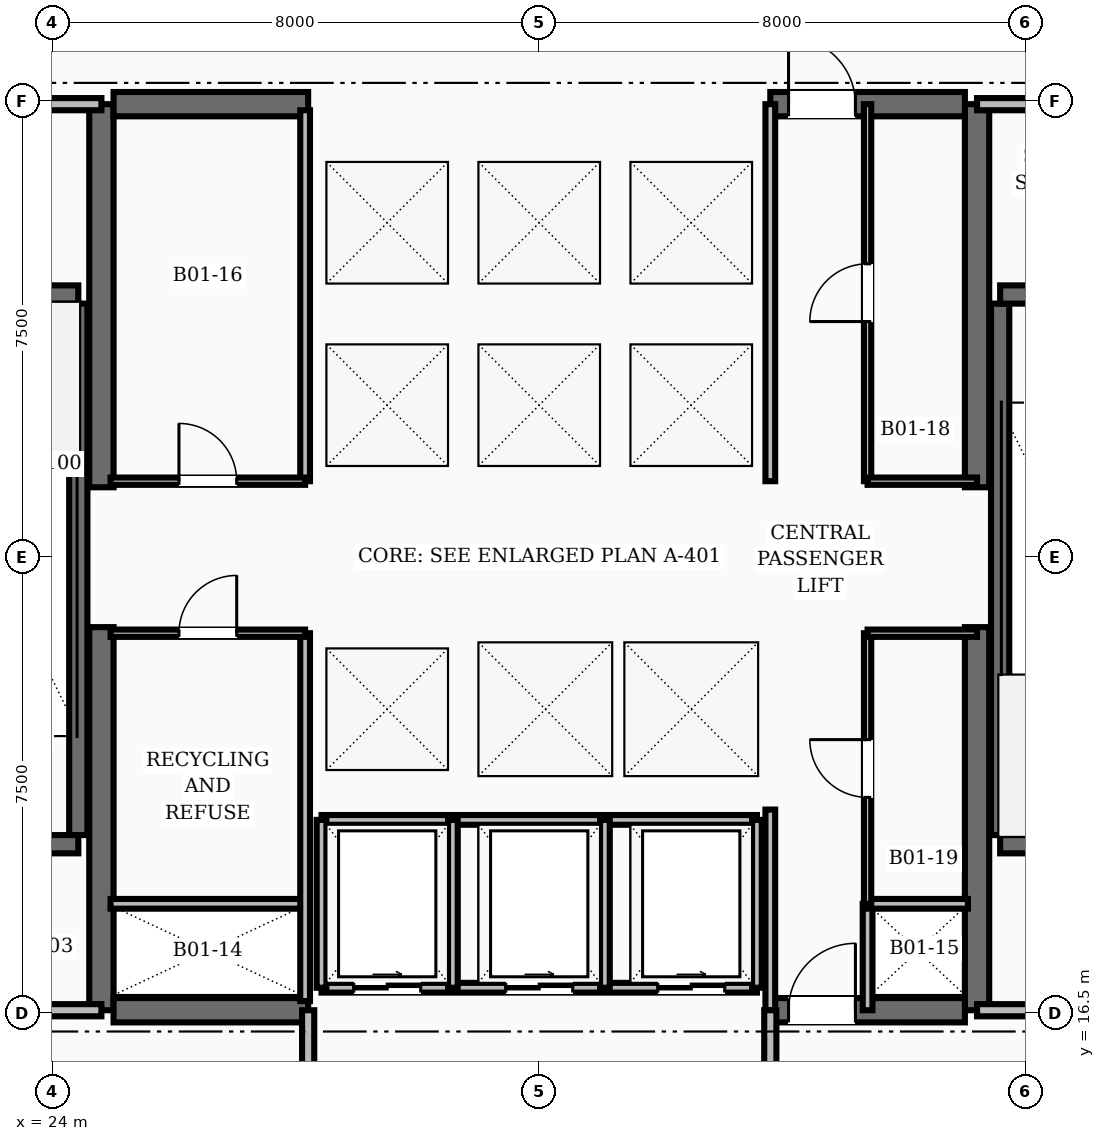
"""IFC4 building model, lengths in metres.
Left out: names, types, materials, properties, quantities, classifications, styles, units other than length and angle.
Written with IfcOpenShell. Run it as: python <this file> out.ifc"""

import sys

from ifc_helpers import new_model, si_unit, direction, frame, frame_2d, origin, place, context, subcontext, project, spatial, rectangle, extrude, element, fill, save


model = new_model("IFC4")
c1 = context("Model", 3, precision=1e-05, world=origin(), true_north=direction((0.0, 1.0)))
c2 = subcontext(c1, "Body", "Model", "MODEL_VIEW")
j1 = project(units=[si_unit("LENGTHUNIT", "METRE"), si_unit("PLANEANGLEUNIT", "RADIAN")], contexts=[c1])
p1 = place(None, origin())
s1 = spatial("IfcSite", under=j1, at=p1, CompositionType="ELEMENT")
p2 = place(p1, origin())
s2 = spatial("IfcBuilding", under=s1, at=p2, CompositionType="ELEMENT")
p3 = place(p2, frame((0.0, 0.0, -5.2)))
s3 = spatial("IfcBuildingStorey", under=s2, at=p3, CompositionType="ELEMENT", Elevation=-5.2)
for number, where, z_axis, x_axis in (
    (1, (24.8, 16.55, 0.0), (0.0, 0.0, 1.0), (0.0, 1.0, 0.0)),
    (2, (24.8, 25.15, 0.0), (0.0, 0.0, 1.0), (0.0, 1.0, 0.0)),
    (3, (39.2, 16.55, 0.0), (0.0, 0.0, 1.0), (0.0, 1.0, 0.0)),
    (4, (39.2, 25.15, 0.0), (0.0, 0.0, 1.0), (0.0, 1.0, 0.0)),
):
    element("IfcWall", number, at=place(p3, frame(where, z_axis=z_axis, x_axis=x_axis)), inside=s3, PredefinedType="SHEAR", context=c2, shape_type="SweptSolid", body=[
        extrude(rectangle(XDim=6.3, YDim=0.4, at=frame_2d((3.15, 0.0))), origin(), (0.0, 0.0, 1.0), 5.2),
    ])
p4 = place(p3, frame((25.0, 16.55, 0.0), z_axis=(0.0, 0.0, 1.0), x_axis=(1.0, 0.0, 0.0)))
e5 = element("IfcWall", 5, at=p4, inside=s3, PredefinedType="SHEAR", context=c2, shape_type="SweptSolid", body=[
    extrude(rectangle(XDim=3.2, YDim=0.4, at=frame_2d((1.6, 0.0))), origin(), (0.0, 0.0, 1.0), 5.2),
])
p5 = place(p3, frame((35.8, 16.55, 0.0), z_axis=(0.0, 0.0, 1.0), x_axis=(1.0, 0.0, 0.0)))
e6 = element("IfcWall", 6, at=p5, inside=s3, PredefinedType="SHEAR", context=c2, shape_type="SweptSolid", body=[
    extrude(rectangle(XDim=3.2, YDim=0.4, at=frame_2d((1.6, 0.0))), origin(), (0.0, 0.0, 1.0), 5.2),
])
p6 = place(p5, frame((0.3, 0.0, 0.0)))
e7 = element("IfcOpeningElement", 7, at=p6, cuts=e6, PredefinedType="OPENING", context=c2, shape_type="SweptSolid", body=[
    extrude(rectangle(XDim=1.1, YDim=2.1, at=frame_2d((0.55, 1.05))), frame((0.0, 0.21, 0.0), z_axis=(0.0, -1.0, 0.0), x_axis=(1.0, 0.0, 0.0)), (0.0, 0.0, 1.0), 0.42),
])
p7 = place(p3, frame((25.0, 31.45, 0.0), z_axis=(0.0, 0.0, 1.0), x_axis=(1.0, 0.0, 0.0)))
e8 = element("IfcWall", 8, at=p7, inside=s3, PredefinedType="SHEAR", context=c2, shape_type="SweptSolid", body=[
    extrude(rectangle(XDim=3.2, YDim=0.4, at=frame_2d((1.6, 0.0))), origin(), (0.0, 0.0, 1.0), 5.2),
])
p8 = place(p3, frame((35.8, 31.45, 0.0), z_axis=(0.0, 0.0, 1.0), x_axis=(1.0, 0.0, 0.0)))
e9 = element("IfcWall", 9, at=p8, inside=s3, PredefinedType="SHEAR", context=c2, shape_type="SweptSolid", body=[
    extrude(rectangle(XDim=3.2, YDim=0.4, at=frame_2d((1.6, 0.0))), origin(), (0.0, 0.0, 1.0), 5.2),
])
p9 = place(p8, frame((0.3, 0.0, 0.0)))
e10 = element("IfcOpeningElement", 10, at=p9, cuts=e9, PredefinedType="OPENING", context=c2, shape_type="SweptSolid", body=[
    extrude(rectangle(XDim=1.1, YDim=2.1, at=frame_2d((0.55, 1.05))), frame((0.0, 0.21, 0.0), z_axis=(0.0, -1.0, 0.0), x_axis=(1.0, 0.0, 0.0)), (0.0, 0.0, 1.0), 0.42),
])
p10 = place(p3, frame((24.42, 19.43, 0.0), z_axis=(0.0, 0.0, 1.0), x_axis=(0.0, 1.0, 0.0)))
e11 = element("IfcWall", 11, at=p10, inside=s3, PredefinedType="SHEAR", context=c2, shape_type="SweptSolid", body=[
    extrude(rectangle(XDim=8.74, YDim=0.3, at=frame_2d((4.37, 0.0))), origin(), (0.0, 0.0, 1.0), 5.2),
])
p11 = place(p3, frame((20.82, 19.28, 0.0), z_axis=(0.0, 0.0, 1.0), x_axis=(1.0, 0.0, 0.0)))
e12 = element("IfcWall", 12, at=p11, inside=s3, PredefinedType="SHEAR", context=c2, shape_type="SweptSolid", body=[
    extrude(rectangle(XDim=3.6, YDim=0.3, at=frame_2d((1.8, 0.0))), origin(), (0.0, 0.0, 1.0), 5.2),
])
p12 = place(p11, frame((1.3, 0.0, 0.0)))
e13 = element("IfcOpeningElement", 13, at=p12, cuts=e12, PredefinedType="OPENING", context=c2, shape_type="SweptSolid", body=[
    extrude(rectangle(XDim=1.1, YDim=2.1, at=frame_2d((0.55, 1.05))), frame((0.0, 0.16, 0.0), z_axis=(0.0, -1.0, 0.0), x_axis=(1.0, 0.0, 0.0)), (0.0, 0.0, 1.0), 0.32),
])
p13 = place(p3, frame((20.82, 28.32, 0.0), z_axis=(0.0, 0.0, 1.0), x_axis=(1.0, 0.0, 0.0)))
e14 = element("IfcWall", 14, at=p13, inside=s3, PredefinedType="SHEAR", context=c2, shape_type="SweptSolid", body=[
    extrude(rectangle(XDim=3.6, YDim=0.3, at=frame_2d((1.8, 0.0))), origin(), (0.0, 0.0, 1.0), 5.2),
])
p14 = place(p3, frame((39.58, 19.43, 0.0), z_axis=(0.0, 0.0, 1.0), x_axis=(0.0, 1.0, 0.0)))
e15 = element("IfcWall", 15, at=p14, inside=s3, PredefinedType="SHEAR", context=c2, shape_type="SweptSolid", body=[
    extrude(rectangle(XDim=8.74, YDim=0.3, at=frame_2d((4.37, 0.0))), origin(), (0.0, 0.0, 1.0), 5.2),
])
p15 = place(p3, frame((39.58, 19.28, 0.0), z_axis=(0.0, 0.0, 1.0), x_axis=(1.0, 0.0, 0.0)))
e16 = element("IfcWall", 16, at=p15, inside=s3, PredefinedType="SHEAR", context=c2, shape_type="SweptSolid", body=[
    extrude(rectangle(XDim=3.6, YDim=0.3, at=frame_2d((1.8, 0.0))), origin(), (0.0, 0.0, 1.0), 5.2),
])
p16 = place(p3, frame((39.58, 28.32, 0.0), z_axis=(0.0, 0.0, 1.0), x_axis=(1.0, 0.0, 0.0)))
e17 = element("IfcWall", 17, at=p16, inside=s3, PredefinedType="SHEAR", context=c2, shape_type="SweptSolid", body=[
    extrude(rectangle(XDim=3.6, YDim=0.3, at=frame_2d((1.8, 0.0))), origin(), (0.0, 0.0, 1.0), 5.2),
])
p17 = place(p16, frame((1.3, 0.0, 0.0)))
e18 = element("IfcOpeningElement", 18, at=p17, cuts=e17, PredefinedType="OPENING", context=c2, shape_type="SweptSolid", body=[
    extrude(rectangle(XDim=1.1, YDim=2.1, at=frame_2d((0.55, 1.05))), frame((0.0, 0.16, 0.0), z_axis=(0.0, -1.0, 0.0), x_axis=(1.0, 0.0, 0.0)), (0.0, 0.0, 1.0), 0.32),
])
for number, where, z_axis, x_axis in (
    (19, (20.82, 16.55, 0.0), (0.0, 0.0, 1.0), (1.0, 0.0, 0.0)),
    (20, (39.2, 31.45, 0.0), (0.0, 0.0, 1.0), (1.0, 0.0, 0.0)),
    (21, (20.82, 31.45, 0.0), (0.0, 0.0, 1.0), (1.0, 0.0, 0.0)),
    (22, (39.2, 16.55, 0.0), (0.0, 0.0, 1.0), (1.0, 0.0, 0.0)),
):
    element("IfcWall", number, at=place(p3, frame(where, z_axis=z_axis, x_axis=x_axis)), inside=s3, PredefinedType="SOLIDWALL", context=c2, shape_type="SweptSolid", body=[
        extrude(rectangle(XDim=3.98, YDim=0.2, at=frame_2d((1.99, 0.0))), origin(), (0.0, 0.0, 1.0), 3.92),
    ])
p18 = place(p3, frame((35.8, 16.55, 0.0), z_axis=(0.0, 0.0, 1.0), x_axis=(0.0, 1.0, 0.0)))
e23 = element("IfcWall", 23, at=p18, inside=s3, PredefinedType="SOLIDWALL", context=c2, shape_type="SweptSolid", body=[
    extrude(rectangle(XDim=3.3, YDim=0.16, at=frame_2d((1.65, 0.0))), origin(), (0.0, 0.0, 1.0), 3.92),
])
p19 = place(p3, frame((37.4, 16.55, 0.0), z_axis=(0.0, 0.0, 1.0), x_axis=(0.0, 1.0, 0.0)))
e24 = element("IfcWall", 24, at=p19, inside=s3, PredefinedType="SOLIDWALL", context=c2, shape_type="SweptSolid", body=[
    extrude(rectangle(XDim=1.75, YDim=0.16, at=frame_2d((0.875, 0.0))), origin(), (0.0, 0.0, 1.0), 3.92),
])
p20 = place(p3, frame((35.8, 25.25, 0.0), z_axis=(0.0, 0.0, 1.0), x_axis=(0.0, 1.0, 0.0)))
e25 = element("IfcWall", 25, at=p20, inside=s3, PredefinedType="SOLIDWALL", context=c2, shape_type="SweptSolid", body=[
    extrude(rectangle(XDim=6.2, YDim=0.16, at=frame_2d((3.1, 0.0))), origin(), (0.0, 0.0, 1.0), 3.92),
])
for number, where, z_axis, x_axis in (
    (26, (28.2, 14.35, 0.0), (0.0, 0.0, 1.0), (0.0, 1.0, 0.0)),
    (27, (35.8, 14.35, 0.0), (0.0, 0.0, 1.0), (0.0, 1.0, 0.0)),
):
    element("IfcWall", number, at=place(p3, frame(where, z_axis=z_axis, x_axis=x_axis)), inside=s3, PredefinedType="SOLIDWALL", context=c2, shape_type="SweptSolid", body=[
        extrude(rectangle(XDim=2.2, YDim=0.2, at=frame_2d((1.1, 0.0))), origin(), (0.0, 0.0, 1.0), 3.92),
    ])
p21 = place(p3, frame((28.42, 16.92, 0.0), z_axis=(0.0, 0.0, 1.0), x_axis=(1.0, 0.0, 0.0)))
e28 = element("IfcWall", 28, at=p21, inside=s3, PredefinedType="SOLIDWALL", context=c2, shape_type="SweptSolid", body=[
    extrude(rectangle(XDim=7.16, YDim=0.16, at=frame_2d((3.58, 0.0))), origin(), (0.0, 0.0, 1.0), 3.92),
])
p22 = place(p21, frame((0.53, 0.0, 0.0)))
e29 = element("IfcOpeningElement", 29, at=p22, cuts=e28, PredefinedType="OPENING", context=c2, shape_type="SweptSolid", body=[
    extrude(rectangle(XDim=1.1, YDim=2.15, at=frame_2d((0.55, 1.075))), frame((0.0, 0.09, 0.0), z_axis=(0.0, -1.0, 0.0), x_axis=(1.0, 0.0, 0.0)), (0.0, 0.0, 1.0), 0.18),
])
p23 = place(p21, frame((3.03, 0.0, 0.0)))
e30 = element("IfcOpeningElement", 30, at=p23, cuts=e28, PredefinedType="OPENING", context=c2, shape_type="SweptSolid", body=[
    extrude(rectangle(XDim=1.1, YDim=2.15, at=frame_2d((0.55, 1.075))), frame((0.0, 0.09, 0.0), z_axis=(0.0, -1.0, 0.0), x_axis=(1.0, 0.0, 0.0)), (0.0, 0.0, 1.0), 0.18),
])
p24 = place(p21, frame((5.53, 0.0, 0.0)))
e31 = element("IfcOpeningElement", 31, at=p24, cuts=e28, PredefinedType="OPENING", context=c2, shape_type="SweptSolid", body=[
    extrude(rectangle(XDim=1.1, YDim=2.15, at=frame_2d((0.55, 1.075))), frame((0.0, 0.09, 0.0), z_axis=(0.0, -1.0, 0.0), x_axis=(1.0, 0.0, 0.0)), (0.0, 0.0, 1.0), 0.18),
])
p25 = place(p3, frame((28.42, 19.68, 0.0), z_axis=(0.0, 0.0, 1.0), x_axis=(1.0, 0.0, 0.0)))
e32 = element("IfcWall", 32, at=p25, inside=s3, PredefinedType="SOLIDWALL", context=c2, shape_type="SweptSolid", body=[
    extrude(rectangle(XDim=7.16, YDim=0.16, at=frame_2d((3.58, 0.0))), origin(), (0.0, 0.0, 1.0), 3.92),
])
for number, where, z_axis, x_axis in (
    (33, (28.42, 16.92, 0.0), (0.0, 0.0, 1.0), (0.0, 1.0, 0.0)),
    (34, (30.58, 16.92, 0.0), (0.0, 0.0, 1.0), (0.0, 1.0, 0.0)),
    (35, (33.08, 16.92, 0.0), (0.0, 0.0, 1.0), (0.0, 1.0, 0.0)),
    (36, (35.58, 16.92, 0.0), (0.0, 0.0, 1.0), (0.0, 1.0, 0.0)),
):
    element("IfcWall", number, at=place(p3, frame(where, z_axis=z_axis, x_axis=x_axis)), inside=s3, PredefinedType="SOLIDWALL", context=c2, shape_type="SweptSolid", body=[
        extrude(rectangle(XDim=2.76, YDim=0.16, at=frame_2d((1.38, 0.0))), origin(), (0.0, 0.0, 1.0), 3.92),
    ])
p26 = place(p3, frame((24.95, 18.3, 0.0), z_axis=(0.0, 0.0, 1.0), x_axis=(1.0, 0.0, 0.0)))
e37 = element("IfcWall", 37, at=p26, inside=s3, PredefinedType="SOLIDWALL", context=c2, shape_type="SweptSolid", body=[
    extrude(rectangle(XDim=3.2, YDim=0.16, at=frame_2d((1.6, 0.0))), origin(), (0.0, 0.0, 1.0), 3.92),
])
p27 = place(p3, frame((28.15, 16.7, 0.0), z_axis=(0.0, 0.0, 1.0), x_axis=(0.0, 1.0, 0.0)))
e38 = element("IfcWall", 38, at=p27, inside=s3, PredefinedType="SOLIDWALL", context=c2, shape_type="SweptSolid", body=[
    extrude(rectangle(XDim=6.05, YDim=0.16, at=frame_2d((3.025, 0.0))), origin(), (0.0, 0.0, 1.0), 3.92),
])
p28 = place(p3, frame((37.4, 18.3, 0.0), z_axis=(0.0, 0.0, 1.0), x_axis=(1.0, 0.0, 0.0)))
e39 = element("IfcWall", 39, at=p28, inside=s3, PredefinedType="SOLIDWALL", context=c2, shape_type="SweptSolid", body=[
    extrude(rectangle(XDim=1.65, YDim=0.16, at=frame_2d((0.825, 0.0))), origin(), (0.0, 0.0, 1.0), 3.92),
])
p29 = place(p3, frame((28.15, 25.25, 0.0), z_axis=(0.0, 0.0, 1.0), x_axis=(0.0, 1.0, 0.0)))
e40 = element("IfcWall", 40, at=p29, inside=s3, PredefinedType="SOLIDWALL", context=c2, shape_type="SweptSolid", body=[
    extrude(rectangle(XDim=6.1, YDim=0.16, at=frame_2d((3.05, 0.0))), origin(), (0.0, 0.0, 1.0), 3.92),
])
p30 = place(p3, frame((24.95, 25.25, 0.0), z_axis=(0.0, 0.0, 1.0), x_axis=(1.0, 0.0, 0.0)))
e41 = element("IfcWall", 41, at=p30, inside=s3, PredefinedType="PARTITIONING", context=c2, shape_type="SweptSolid", body=[
    extrude(rectangle(XDim=3.2, YDim=0.12, at=frame_2d((1.6, 0.0))), origin(), (0.0, 0.0, 1.0), 3.92),
])
p31 = place(p30, frame((1.125, 0.0, 0.0)))
e42 = element("IfcOpeningElement", 42, at=p31, cuts=e41, PredefinedType="OPENING", context=c2, shape_type="SweptSolid", body=[
    extrude(rectangle(XDim=0.95, YDim=2.1, at=frame_2d((0.475, 1.05))), frame((0.0, 0.07, 0.0), z_axis=(0.0, -1.0, 0.0), x_axis=(1.0, 0.0, 0.0)), (0.0, 0.0, 1.0), 0.14),
])
p32 = place(p3, frame((24.95, 22.75, 0.0), z_axis=(0.0, 0.0, 1.0), x_axis=(1.0, 0.0, 0.0)))
e43 = element("IfcWall", 43, at=p32, inside=s3, PredefinedType="PARTITIONING", context=c2, shape_type="SweptSolid", body=[
    extrude(rectangle(XDim=3.2, YDim=0.12, at=frame_2d((1.6, 0.0))), origin(), (0.0, 0.0, 1.0), 3.92),
])
p33 = place(p32, frame((1.125, 0.0, 0.0)))
e44 = element("IfcOpeningElement", 44, at=p33, cuts=e43, PredefinedType="OPENING", context=c2, shape_type="SweptSolid", body=[
    extrude(rectangle(XDim=0.95, YDim=2.1, at=frame_2d((0.475, 1.05))), frame((0.0, 0.07, 0.0), z_axis=(0.0, -1.0, 0.0), x_axis=(1.0, 0.0, 0.0)), (0.0, 0.0, 1.0), 0.14),
])
p34 = place(p3, frame((37.4, 25.25, 0.0), z_axis=(0.0, 0.0, 1.0), x_axis=(0.0, 1.0, 0.0)))
e45 = element("IfcWall", 45, at=p34, inside=s3, PredefinedType="PARTITIONING", context=c2, shape_type="SweptSolid", body=[
    extrude(rectangle(XDim=6.2, YDim=0.12, at=frame_2d((3.1, 0.0))), origin(), (0.0, 0.0, 1.0), 3.92),
])
p35 = place(p34, frame((2.625, 0.0, 0.0)))
e46 = element("IfcOpeningElement", 46, at=p35, cuts=e45, PredefinedType="OPENING", context=c2, shape_type="SweptSolid", body=[
    extrude(rectangle(XDim=0.95, YDim=2.1, at=frame_2d((0.475, 1.05))), frame((0.0, 0.07, 0.0), z_axis=(0.0, -1.0, 0.0), x_axis=(1.0, 0.0, 0.0)), (0.0, 0.0, 1.0), 0.14),
])
p36 = place(p3, frame((37.4, 25.25, 0.0), z_axis=(0.0, 0.0, 1.0), x_axis=(1.0, 0.0, 0.0)))
e47 = element("IfcWall", 47, at=p36, inside=s3, PredefinedType="PARTITIONING", context=c2, shape_type="SweptSolid", body=[
    extrude(rectangle(XDim=1.8, YDim=0.12, at=frame_2d((0.9, 0.0))), origin(), (0.0, 0.0, 1.0), 3.92),
])
p37 = place(p3, frame((37.4, 18.3, 0.0), z_axis=(0.0, 0.0, 1.0), x_axis=(0.0, 1.0, 0.0)))
e48 = element("IfcWall", 48, at=p37, inside=s3, PredefinedType="PARTITIONING", context=c2, shape_type="SweptSolid", body=[
    extrude(rectangle(XDim=4.45, YDim=0.12, at=frame_2d((2.225, 0.0))), origin(), (0.0, 0.0, 1.0), 3.92),
])
p38 = place(p37, frame((1.75, 0.0, 0.0)))
e49 = element("IfcOpeningElement", 49, at=p38, cuts=e48, PredefinedType="OPENING", context=c2, shape_type="SweptSolid", body=[
    extrude(rectangle(XDim=0.95, YDim=2.1, at=frame_2d((0.475, 1.05))), frame((0.0, 0.07, 0.0), z_axis=(0.0, -1.0, 0.0), x_axis=(1.0, 0.0, 0.0)), (0.0, 0.0, 1.0), 0.14),
])
p39 = place(p3, frame((37.4, 22.75, 0.0), z_axis=(0.0, 0.0, 1.0), x_axis=(1.0, 0.0, 0.0)))
e50 = element("IfcWall", 50, at=p39, inside=s3, PredefinedType="PARTITIONING", context=c2, shape_type="SweptSolid", body=[
    extrude(rectangle(XDim=1.8, YDim=0.12, at=frame_2d((0.9, 0.0))), origin(), (0.0, 0.0, 1.0), 3.92),
])
p40 = place(p9, origin())
e51 = element("IfcDoor", 51, at=p40, inside=s3, OperationType="SINGLE_SWING_LEFT", PredefinedType="DOOR", context=c2, shape_type="SweptSolid", body=[
    extrude(rectangle(XDim=1.1, YDim=2.1, at=frame_2d((0.55, 1.05))), frame((0.0, 0.025, 0.0), z_axis=(0.0, -1.0, 0.0), x_axis=(1.0, 0.0, 0.0)), (0.0, 0.0, 1.0), 0.05),
])
fill(e10, e51)
p41 = place(p6, origin())
e52 = element("IfcDoor", 52, at=p41, inside=s3, OperationType="SINGLE_SWING_RIGHT", PredefinedType="DOOR", context=c2, shape_type="SweptSolid", body=[
    extrude(rectangle(XDim=1.1, YDim=2.1, at=frame_2d((0.55, 1.05))), frame((0.0, 0.025, 0.0), z_axis=(0.0, -1.0, 0.0), x_axis=(1.0, 0.0, 0.0)), (0.0, 0.0, 1.0), 0.05),
])
fill(e7, e52)
p42 = place(p22, origin())
e53 = element("IfcDoor", 53, at=p42, inside=s3, OperationType="SLIDING_TO_RIGHT", PredefinedType="DOOR", context=c2, shape_type="SweptSolid", body=[
    extrude(rectangle(XDim=1.1, YDim=2.15, at=frame_2d((0.55, 1.075))), frame((0.0, 0.025, 0.0), z_axis=(0.0, -1.0, 0.0), x_axis=(1.0, 0.0, 0.0)), (0.0, 0.0, 1.0), 0.05),
])
fill(e29, e53)
p43 = place(p23, origin())
e54 = element("IfcDoor", 54, at=p43, inside=s3, OperationType="SLIDING_TO_RIGHT", PredefinedType="DOOR", context=c2, shape_type="SweptSolid", body=[
    extrude(rectangle(XDim=1.1, YDim=2.15, at=frame_2d((0.55, 1.075))), frame((0.0, 0.025, 0.0), z_axis=(0.0, -1.0, 0.0), x_axis=(1.0, 0.0, 0.0)), (0.0, 0.0, 1.0), 0.05),
])
fill(e30, e54)
p44 = place(p24, origin())
e55 = element("IfcDoor", 55, at=p44, inside=s3, OperationType="SLIDING_TO_RIGHT", PredefinedType="DOOR", context=c2, shape_type="SweptSolid", body=[
    extrude(rectangle(XDim=1.1, YDim=2.15, at=frame_2d((0.55, 1.075))), frame((0.0, 0.025, 0.0), z_axis=(0.0, -1.0, 0.0), x_axis=(1.0, 0.0, 0.0)), (0.0, 0.0, 1.0), 0.05),
])
fill(e31, e55)
p45 = place(p31, origin())
e56 = element("IfcDoor", 56, at=p45, inside=s3, OperationType="SINGLE_SWING_LEFT", PredefinedType="DOOR", context=c2, shape_type="SweptSolid", body=[
    extrude(rectangle(XDim=0.95, YDim=2.1, at=frame_2d((0.475, 1.05))), frame((0.0, 0.025, 0.0), z_axis=(0.0, -1.0, 0.0), x_axis=(1.0, 0.0, 0.0)), (0.0, 0.0, 1.0), 0.05),
])
fill(e42, e56)
p46 = place(p33, origin())
e57 = element("IfcDoor", 57, at=p46, inside=s3, OperationType="SINGLE_SWING_RIGHT", PredefinedType="DOOR", context=c2, shape_type="SweptSolid", body=[
    extrude(rectangle(XDim=0.95, YDim=2.1, at=frame_2d((0.475, 1.05))), frame((0.0, 0.025, 0.0), z_axis=(0.0, -1.0, 0.0), x_axis=(1.0, 0.0, 0.0)), (0.0, 0.0, 1.0), 0.05),
])
fill(e44, e57)
p47 = place(p35, origin())
e58 = element("IfcDoor", 58, at=p47, inside=s3, OperationType="SINGLE_SWING_LEFT", PredefinedType="DOOR", context=c2, shape_type="SweptSolid", body=[
    extrude(rectangle(XDim=0.95, YDim=2.1, at=frame_2d((0.475, 1.05))), frame((0.0, 0.025, 0.0), z_axis=(0.0, -1.0, 0.0), x_axis=(1.0, 0.0, 0.0)), (0.0, 0.0, 1.0), 0.05),
])
fill(e46, e58)
p48 = place(p38, origin())
e59 = element("IfcDoor", 59, at=p48, inside=s3, OperationType="SINGLE_SWING_RIGHT", PredefinedType="DOOR", context=c2, shape_type="SweptSolid", body=[
    extrude(rectangle(XDim=0.95, YDim=2.1, at=frame_2d((0.475, 1.05))), frame((0.0, 0.025, 0.0), z_axis=(0.0, -1.0, 0.0), x_axis=(1.0, 0.0, 0.0)), (0.0, 0.0, 1.0), 0.05),
])
fill(e49, e59)
save(model, sys.argv[1])
